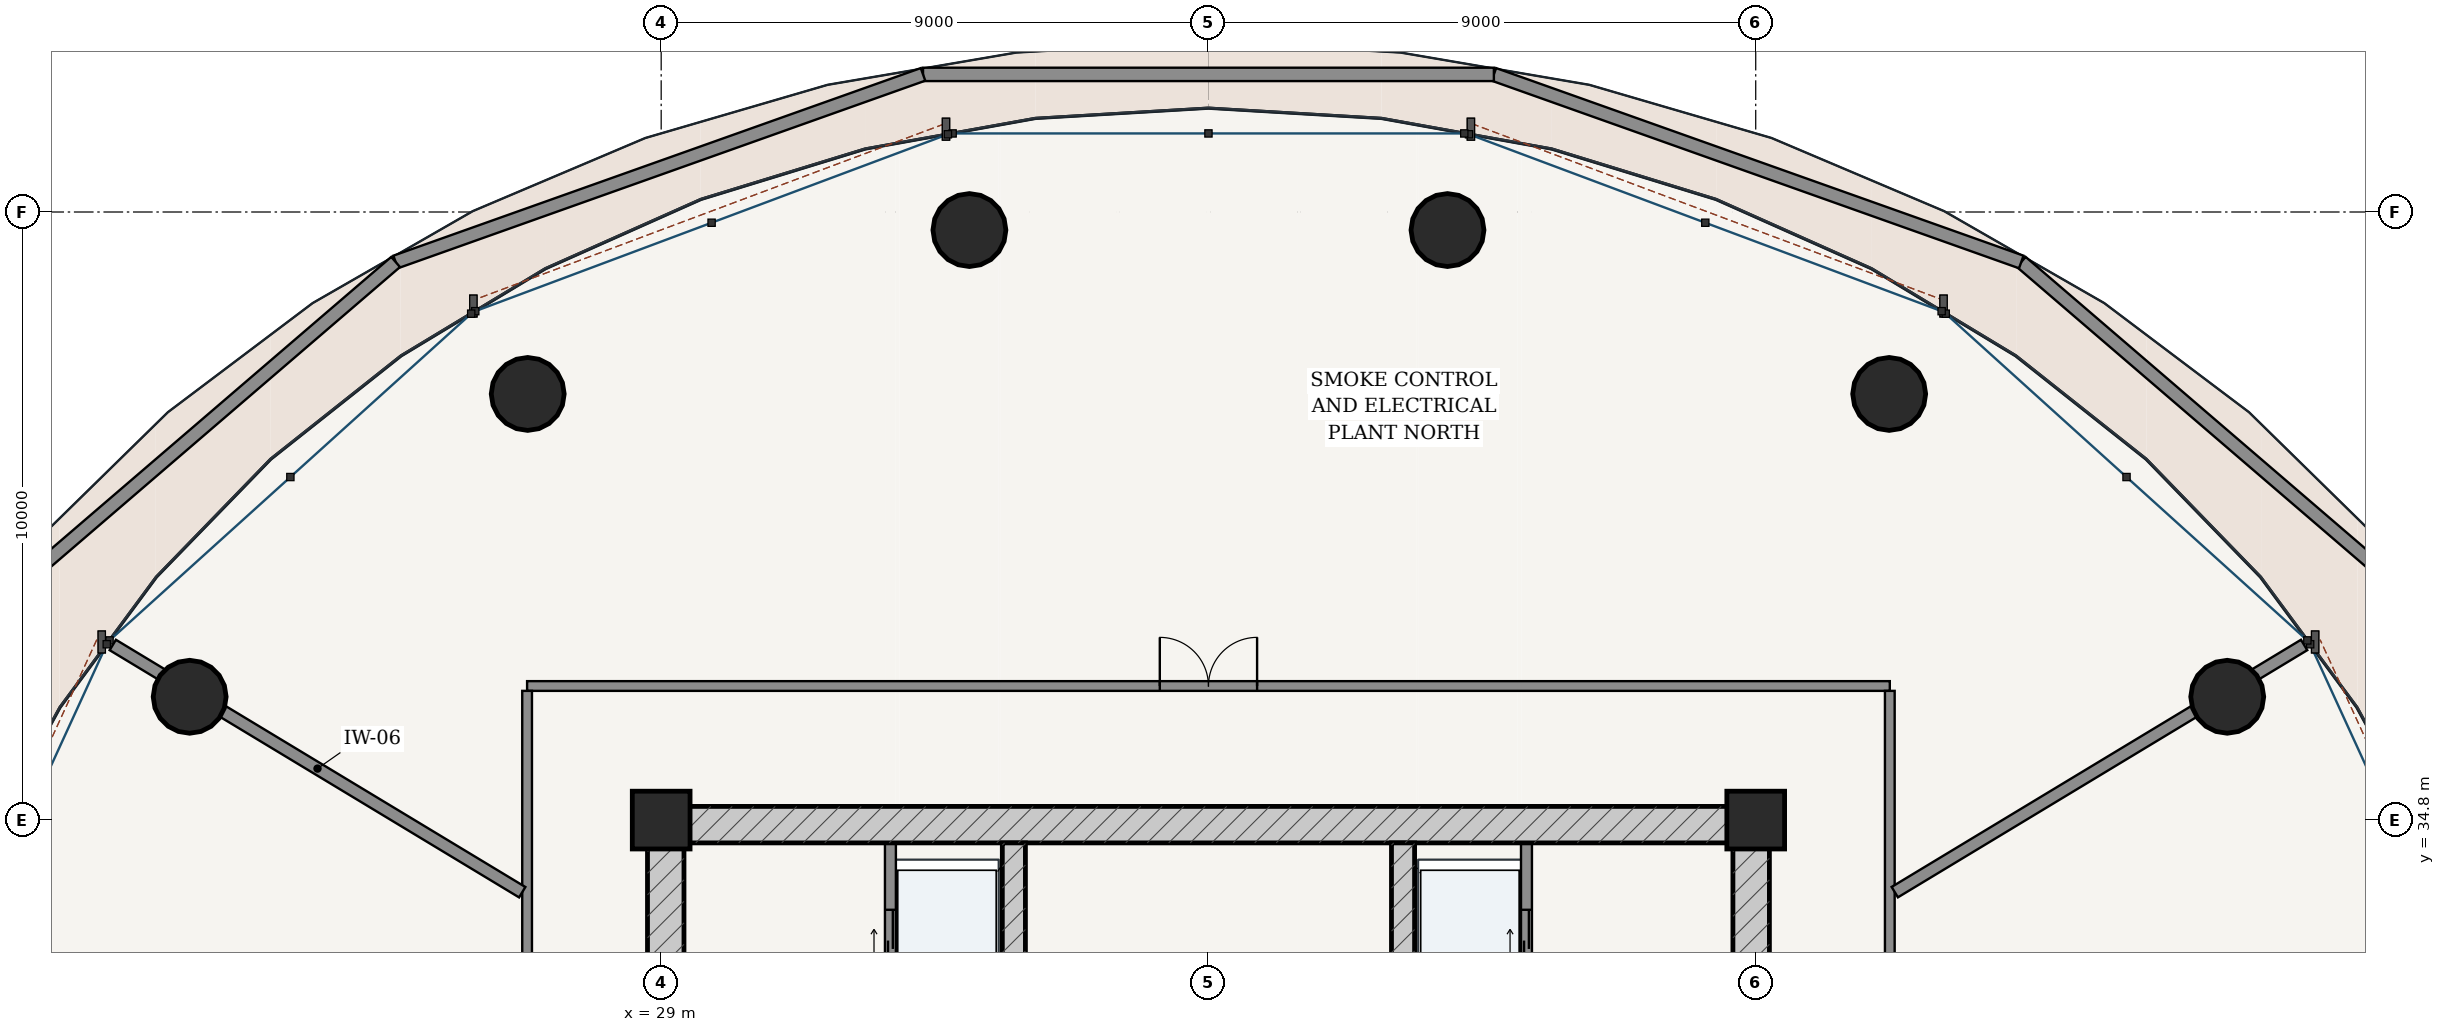
"""IFC4 building model, lengths in metres.
Left out: names, types, materials, properties, quantities, classifications, styles, units other than length and angle.
Written with IfcOpenShell. Run it as: python <this file> out.ifc"""

import sys

from ifc_helpers import new_model, si_unit, direction, frame, frame_2d, origin, origin_2d, place, context, subcontext, project, spatial, rectangle, hollow_circle, extrude, source, transform, mapped, element, fill, save


model = new_model("IFC4")
c1 = context("Model", 3, precision=1e-05, world=origin(), true_north=direction((-0.2419218956, 0.970295726276)))
c2 = subcontext(c1, "Body", "Model", "MODEL_VIEW")
j1 = project(units=[si_unit("LENGTHUNIT", "METRE"), si_unit("PLANEANGLEUNIT", "RADIAN")], contexts=[c1])
p1 = place(None, origin())
s1 = spatial("IfcSite", under=j1, at=p1, CompositionType="ELEMENT")
p2 = place(p1, origin())
s2 = spatial("IfcBuilding", under=s1, at=p2, CompositionType="ELEMENT")
p3 = place(p2, frame((0.0, 0.0, 185.8)))
s3 = spatial("IfcBuildingStorey", under=s2, at=p3, CompositionType="ELEMENT", Elevation=185.8)
for number, where, z_axis, x_axis in (
    (1, (47.0, 34.8, 0.0), (0.0, 0.0, 1.0), (1.0, 0.0, 0.0)),
    (2, (29.0, 34.8, 0.0), (0.0, 0.0, 1.0), (1.0, 0.0, 0.0)),
):
    element("IfcColumn", number, at=place(p3, frame(where, z_axis=z_axis, x_axis=x_axis)), inside=s3, PredefinedType="COLUMN", context=c2, shape_type="SweptSolid", body=[
        extrude(rectangle(XDim=0.95, YDim=0.95, at=origin_2d()), origin(), (0.0, 0.0, 1.0), 5.4),
    ])
p4 = place(p3, frame((28.775, 34.725, 0.0), z_axis=(0.0, 0.0, 1.0), x_axis=(1.0, 0.0, 0.0)))
e3 = element("IfcWall", 3, at=p4, inside=s3, PredefinedType="SHEAR", context=c2, shape_type="SweptSolid", body=[
    extrude(rectangle(XDim=18.45, YDim=0.6, at=frame_2d((9.225, 0.0))), origin(), (0.0, 0.0, 1.0), 5.135),
])
p5 = place(p3, frame((29.075, 19.175, 0.0), z_axis=(0.0, 0.0, 1.0), x_axis=(0.0, 1.0, 0.0)))
e4 = element("IfcWall", 4, at=p5, inside=s3, PredefinedType="SHEAR", context=c2, shape_type="SweptSolid", body=[
    extrude(rectangle(XDim=15.25, YDim=0.6, at=frame_2d((7.625, 0.0))), origin(), (0.0, 0.0, 1.0), 5.135),
])
p6 = place(p5, frame((9.875, 0.0, 0.0)))
e5 = element("IfcOpeningElement", 5, at=p6, cuts=e4, PredefinedType="OPENING", context=c2, shape_type="SweptSolid", body=[
    extrude(rectangle(XDim=1.5, YDim=2.2, at=frame_2d((0.75, 1.1))), frame((0.0, 0.31, 0.0), z_axis=(0.0, -1.0, 0.0), x_axis=(1.0, 0.0, 0.0)), (0.0, 0.0, 1.0), 0.62),
])
p7 = place(p3, frame((46.925, 19.175, 0.0), z_axis=(0.0, 0.0, 1.0), x_axis=(0.0, 1.0, 0.0)))
e6 = element("IfcWall", 6, at=p7, inside=s3, PredefinedType="SHEAR", context=c2, shape_type="SweptSolid", body=[
    extrude(rectangle(XDim=15.25, YDim=0.6, at=frame_2d((7.625, 0.0))), origin(), (0.0, 0.0, 1.0), 5.135),
])
p8 = place(p7, frame((9.875, 0.0, 0.0)))
e7 = element("IfcOpeningElement", 7, at=p8, cuts=e6, PredefinedType="OPENING", context=c2, shape_type="SweptSolid", body=[
    extrude(rectangle(XDim=1.5, YDim=2.2, at=frame_2d((0.75, 1.1))), frame((0.0, 0.31, 0.0), z_axis=(0.0, -1.0, 0.0), x_axis=(1.0, 0.0, 0.0)), (0.0, 0.0, 1.0), 0.62),
])
p9 = place(p3, frame((34.8, 19.175, 0.0), z_axis=(0.0, 0.0, 1.0), x_axis=(0.0, 1.0, 0.0)))
e8 = element("IfcWall", 8, at=p9, inside=s3, PredefinedType="SHEAR", context=c2, shape_type="SweptSolid", body=[
    extrude(rectangle(XDim=15.25, YDim=0.38, at=frame_2d((7.625, 0.0))), origin(), (0.0, 0.0, 1.0), 5.135),
])
p10 = place(p9, frame((7.8, 0.0, 0.0)))
e9 = element("IfcOpeningElement", 9, at=p10, cuts=e8, PredefinedType="OPENING", context=c2, shape_type="SweptSolid", body=[
    extrude(rectangle(XDim=1.05, YDim=2.15, at=frame_2d((0.525, 1.075))), frame((0.0, 0.2, 0.0), z_axis=(0.0, -1.0, 0.0), x_axis=(1.0, 0.0, 0.0)), (0.0, 0.0, 1.0), 0.4),
])
p11 = place(p3, frame((41.2, 19.175, 0.0), z_axis=(0.0, 0.0, 1.0), x_axis=(0.0, 1.0, 0.0)))
e10 = element("IfcWall", 10, at=p11, inside=s3, PredefinedType="SHEAR", context=c2, shape_type="SweptSolid", body=[
    extrude(rectangle(XDim=15.25, YDim=0.38, at=frame_2d((7.625, 0.0))), origin(), (0.0, 0.0, 1.0), 5.135),
])
p12 = place(p11, frame((7.8, 0.0, 0.0)))
e11 = element("IfcOpeningElement", 11, at=p12, cuts=e10, PredefinedType="OPENING", context=c2, shape_type="SweptSolid", body=[
    extrude(rectangle(XDim=1.05, YDim=2.15, at=frame_2d((0.525, 1.075))), frame((0.0, 0.2, 0.0), z_axis=(0.0, -1.0, 0.0), x_axis=(1.0, 0.0, 0.0)), (0.0, 0.0, 1.0), 0.4),
])
for number, where, z_axis, x_axis in (
    (12, (54.754, 36.828, 0.0), (0.0, 0.0, 1.0), (1.0, 0.0, 0.0)),
    (13, (49.195, 41.808, 0.0), (0.0, 0.0, 1.0), (1.0, 0.0, 0.0)),
    (14, (41.931, 44.503, 0.0), (0.0, 0.0, 1.0), (1.0, 0.0, 0.0)),
    (15, (34.069, 44.503, 0.0), (0.0, 0.0, 1.0), (1.0, 0.0, 0.0)),
    (16, (26.805, 41.808, 0.0), (0.0, 0.0, 1.0), (1.0, 0.0, 0.0)),
    (17, (21.246, 36.828, 0.0), (0.0, 0.0, 1.0), (1.0, 0.0, 0.0)),
):
    element("IfcColumn", number, at=place(p3, frame(where, z_axis=z_axis, x_axis=x_axis)), inside=s3, PredefinedType="COLUMN", context=c2, shape_type="SweptSolid", body=[
        extrude(hollow_circle(Radius=0.6, WallThickness=0.038, at=origin_2d()), origin(), (0.0, 0.0, 1.0), 5.4),
    ])
p13 = place(p3, frame((58.005, 38.278, 0.0), z_axis=(0.0, 0.0, 1.0), x_axis=(-0.758673296268, 0.651471280664, 0.0)))
e18 = element("IfcWall", 18, at=p13, inside=s3, PredefinedType="PARAPET", context=c2, shape_type="SweptSolid", body=[
    extrude(rectangle(XDim=8.75, YDim=0.22, at=frame_2d((4.375, 0.0))), origin(), (0.0, 0.0, 1.0), 1.15),
])
p14 = place(p3, frame((51.367, 43.978, 0.0), z_axis=(0.0, 0.0, 1.0), x_axis=(-0.942182129644, 0.335101230346, 0.0)))
e19 = element("IfcWall", 19, at=p14, inside=s3, PredefinedType="PARAPET", context=c2, shape_type="SweptSolid", body=[
    extrude(rectangle(XDim=9.205, YDim=0.22, at=frame_2d((4.603, 0.0))), origin(), (0.0, 0.0, 1.0), 1.15),
])
p15 = place(p3, frame((42.694, 47.063, 0.0), z_axis=(0.0, 0.0, 1.0), x_axis=(-1.0, 0.0, 0.0)))
e20 = element("IfcWall", 20, at=p15, inside=s3, PredefinedType="PARAPET", context=c2, shape_type="SweptSolid", body=[
    extrude(rectangle(XDim=9.388, YDim=0.22, at=frame_2d((4.694, 0.0))), origin(), (0.0, 0.0, 1.0), 1.15),
])
p16 = place(p3, frame((33.306, 47.063, 0.0), z_axis=(0.0, 0.0, 1.0), x_axis=(-0.942182129644, -0.335101230346, 0.0)))
e21 = element("IfcWall", 21, at=p16, inside=s3, PredefinedType="PARAPET", context=c2, shape_type="SweptSolid", body=[
    extrude(rectangle(XDim=9.205, YDim=0.22, at=frame_2d((4.603, 0.0))), origin(), (0.0, 0.0, 1.0), 1.15),
])
p17 = place(p3, frame((24.633, 43.978, 0.0), z_axis=(0.0, 0.0, 1.0), x_axis=(-0.758673296268, -0.651471280664, 0.0)))
e22 = element("IfcWall", 22, at=p17, inside=s3, PredefinedType="PARAPET", context=c2, shape_type="SweptSolid", body=[
    extrude(rectangle(XDim=8.75, YDim=0.22, at=frame_2d((4.375, 0.0))), origin(), (0.0, 0.0, 1.0), 1.15),
])
p18 = place(p3, frame((32.77, 28.52, 0.0), z_axis=(0.0, 0.0, 1.0), x_axis=(0.0, 1.0, 0.0)))
e23 = element("IfcWall", 23, at=p18, inside=s3, PredefinedType="PARTITIONING", context=c2, shape_type="SweptSolid", body=[
    extrude(rectangle(XDim=5.905, YDim=0.18, at=frame_2d((2.953, 0.0))), origin(), (0.0, 0.0, 1.0), 5.135),
])
p19 = place(p18, frame((3.655, 0.0, 0.0)))
e24 = element("IfcOpeningElement", 24, at=p19, cuts=e23, PredefinedType="OPENING", context=c2, shape_type="SweptSolid", body=[
    extrude(rectangle(XDim=1.15, YDim=2.2, at=frame_2d((0.575, 1.1))), frame((0.0, 0.1, 0.0), z_axis=(0.0, -1.0, 0.0), x_axis=(1.0, 0.0, 0.0)), (0.0, 0.0, 1.0), 0.2),
])
p20 = place(p18, frame((0.73, 0.0, 0.0)))
e25 = element("IfcOpeningElement", 25, at=p20, cuts=e23, PredefinedType="OPENING", context=c2, shape_type="SweptSolid", body=[
    extrude(rectangle(XDim=1.2, YDim=2.25, at=frame_2d((0.6, 1.125))), frame((0.0, 0.1, 0.0), z_axis=(0.0, -1.0, 0.0), x_axis=(1.0, 0.0, 0.0)), (0.0, 0.0, 1.0), 0.2),
])
p21 = place(p3, frame((43.23, 28.52, 0.0), z_axis=(0.0, 0.0, 1.0), x_axis=(0.0, 1.0, 0.0)))
e26 = element("IfcWall", 26, at=p21, inside=s3, PredefinedType="PARTITIONING", context=c2, shape_type="SweptSolid", body=[
    extrude(rectangle(XDim=5.905, YDim=0.18, at=frame_2d((2.953, 0.0))), origin(), (0.0, 0.0, 1.0), 5.135),
])
p22 = place(p21, frame((0.905, 0.0, 0.0)))
e27 = element("IfcOpeningElement", 27, at=p22, cuts=e26, PredefinedType="OPENING", context=c2, shape_type="SweptSolid", body=[
    extrude(rectangle(XDim=0.85, YDim=2.1, at=frame_2d((0.425, 1.05))), frame((0.0, 0.1, 0.0), z_axis=(0.0, -1.0, 0.0), x_axis=(1.0, 0.0, 0.0)), (0.0, 0.0, 1.0), 0.2),
])
p23 = place(p21, frame((3.655, 0.0, 0.0)))
e28 = element("IfcOpeningElement", 28, at=p23, cuts=e26, PredefinedType="OPENING", context=c2, shape_type="SweptSolid", body=[
    extrude(rectangle(XDim=1.15, YDim=2.2, at=frame_2d((0.575, 1.1))), frame((0.0, 0.1, 0.0), z_axis=(0.0, -1.0, 0.0), x_axis=(1.0, 0.0, 0.0)), (0.0, 0.0, 1.0), 0.2),
])
p24 = place(p3, frame((26.795, 37.005, 0.0), z_axis=(0.0, 0.0, 1.0), x_axis=(1.0, 0.0, 0.0)))
e29 = element("IfcWall", 29, at=p24, inside=s3, PredefinedType="PARTITIONING", context=c2, shape_type="SweptSolid", body=[
    extrude(rectangle(XDim=22.41, YDim=0.16, at=frame_2d((11.205, 0.0))), origin(), (0.0, 0.0, 1.0), 4.651),
])
p25 = place(p24, frame((10.405, 0.0, 0.0)))
e30 = element("IfcOpeningElement", 30, at=p25, cuts=e29, PredefinedType="OPENING", context=c2, shape_type="SweptSolid", body=[
    extrude(rectangle(XDim=1.6, YDim=2.25, at=frame_2d((0.8, 1.125))), frame((0.0, 0.09, 0.0), z_axis=(0.0, -1.0, 0.0), x_axis=(1.0, 0.0, 0.0)), (0.0, 0.0, 1.0), 0.18),
])
p26 = place(p3, frame((26.795, 16.675, 0.0), z_axis=(0.0, 0.0, 1.0), x_axis=(0.0, 1.0, 0.0)))
e31 = element("IfcWall", 31, at=p26, inside=s3, PredefinedType="PARTITIONING", context=c2, shape_type="SweptSolid", body=[
    extrude(rectangle(XDim=20.25, YDim=0.16, at=frame_2d((10.125, 0.0))), origin(), (0.0, 0.0, 1.0), 4.651),
])
p27 = place(p26, frame((9.375, 0.0, 0.0)))
e32 = element("IfcOpeningElement", 32, at=p27, cuts=e31, PredefinedType="OPENING", context=c2, shape_type="SweptSolid", body=[
    extrude(rectangle(XDim=1.5, YDim=2.2, at=frame_2d((0.75, 1.1))), frame((0.0, 0.09, 0.0), z_axis=(0.0, -1.0, 0.0), x_axis=(1.0, 0.0, 0.0)), (0.0, 0.0, 1.0), 0.18),
])
p28 = place(p3, frame((49.205, 16.675, 0.0), z_axis=(0.0, 0.0, 1.0), x_axis=(0.0, 1.0, 0.0)))
e33 = element("IfcWall", 33, at=p28, inside=s3, PredefinedType="PARTITIONING", context=c2, shape_type="SweptSolid", body=[
    extrude(rectangle(XDim=20.25, YDim=0.16, at=frame_2d((10.125, 0.0))), origin(), (0.0, 0.0, 1.0), 4.651),
])
p29 = place(p28, frame((9.325, 0.0, 0.0)))
e34 = element("IfcOpeningElement", 34, at=p29, cuts=e33, PredefinedType="OPENING", context=c2, shape_type="SweptSolid", body=[
    extrude(rectangle(XDim=1.6, YDim=2.25, at=frame_2d((0.8, 1.125))), frame((0.0, 0.09, 0.0), z_axis=(0.0, -1.0, 0.0), x_axis=(1.0, 0.0, 0.0)), (0.0, 0.0, 1.0), 0.18),
])
p30 = place(p3, frame((26.715, 33.614, 0.0), z_axis=(0.0, 0.0, 1.0), x_axis=(-0.856046306453, 0.516899140266, 0.0)))
e35 = element("IfcWall", 35, at=p30, inside=s3, PredefinedType="PARTITIONING", context=c2, shape_type="SweptSolid", body=[
    extrude(rectangle(XDim=7.866, YDim=0.2, at=frame_2d((3.933, 0.0))), origin(), (0.0, 0.0, 1.0), 4.651),
])
p31 = place(p3, frame((49.287, 33.615, 0.0), z_axis=(0.0, 0.0, 1.0), x_axis=(0.856043191518, 0.516904298933, 0.0)))
e36 = element("IfcWall", 36, at=p31, inside=s3, PredefinedType="PARTITIONING", context=c2, shape_type="SweptSolid", body=[
    extrude(rectangle(XDim=7.864, YDim=0.2, at=frame_2d((3.932, 0.0))), origin(), (0.0, 0.0, 1.0), 4.651),
])
m1 = source(origin(), c2, "Body", "SweptSolid", [
    extrude(rectangle(XDim=1.15, YDim=2.2, at=frame_2d((0.575, 1.1))), frame((0.0, 0.025, 0.0), z_axis=(0.0, -1.0, 0.0), x_axis=(1.0, 0.0, 0.0)), (0.0, 0.0, 1.0), 0.05),
])
p32 = place(p19, origin())
e37 = element("IfcDoor", 37, at=p32, inside=s3, OperationType="DOUBLE_DOOR_SLIDING", PredefinedType="DOOR", context=c2, shape_type="MappedRepresentation", body=[
    mapped(m1, transform((0.0, 0.0, 0.0), scale=1.0)),
])
fill(e24, e37)
p33 = place(p23, origin())
e38 = element("IfcDoor", 38, at=p33, inside=s3, OperationType="DOUBLE_DOOR_SLIDING", PredefinedType="DOOR", context=c2, shape_type="MappedRepresentation", body=[
    mapped(m1, transform((0.0, 0.0, 0.0), scale=1.0)),
])
fill(e28, e38)
m2 = source(origin(), c2, "Body", "SweptSolid", [
    extrude(rectangle(XDim=1.6, YDim=2.25, at=frame_2d((0.8, 1.125))), frame((0.0, 0.025, 0.0), z_axis=(0.0, -1.0, 0.0), x_axis=(1.0, 0.0, 0.0)), (0.0, 0.0, 1.0), 0.05),
])
p34 = place(p25, origin())
e39 = element("IfcDoor", 39, at=p34, inside=s3, OperationType="DOUBLE_DOOR_SINGLE_SWING", PredefinedType="DOOR", context=c2, shape_type="MappedRepresentation", body=[
    mapped(m2, transform((0.0, 0.0, 0.0), scale=1.0)),
])
fill(e30, e39)
save(model, sys.argv[1])
